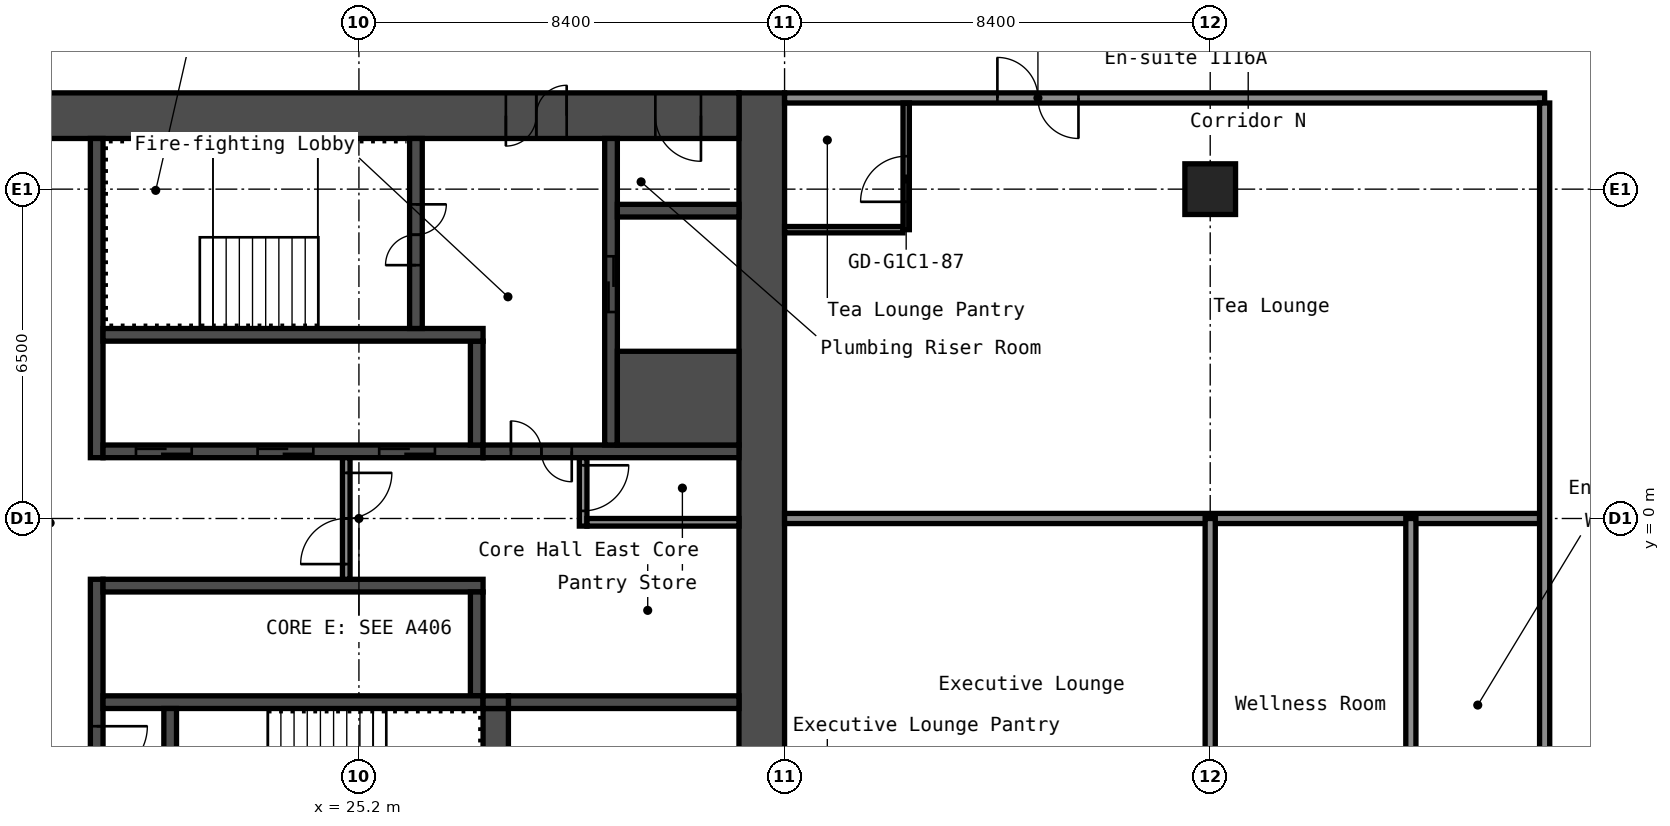
"""IFC4 building model, lengths in metres.
Left out: names, types, materials, properties, quantities, classifications, styles, units other than length and angle.
Written with IfcOpenShell. Run it as: python <this file> out.ifc"""

import sys

from ifc_helpers import new_model, si_unit, direction, frame, frame_2d, origin, origin_2d, place, context, subcontext, project, spatial, rectangle, hollow_rectangle, extrude, element, fill, save


model = new_model("IFC4")
c1 = context("Model", 3, precision=1e-05, world=origin(), true_north=direction((0.0, 1.0)))
c2 = subcontext(c1, "Body", "Model", "MODEL_VIEW")
j1 = project(units=[si_unit("LENGTHUNIT", "METRE"), si_unit("PLANEANGLEUNIT", "RADIAN")], contexts=[c1])
p1 = place(None, origin())
s1 = spatial("IfcSite", under=j1, at=p1, CompositionType="ELEMENT")
p2 = place(p1, origin())
s2 = spatial("IfcBuilding", under=s1, at=p2, CompositionType="ELEMENT")
p3 = place(p2, frame((0.0, 0.0, 42.2)))
s3 = spatial("IfcBuildingStorey", under=s2, at=p3, CompositionType="ELEMENT", Elevation=42.2)
p4 = place(p3, frame((42.0, 6.5, 0.0), z_axis=(0.0, 0.0, 1.0), x_axis=(1.0, 0.0, 0.0)))
e1 = element("IfcColumn", 1, at=p4, inside=s3, PredefinedType="COLUMN", context=c2, shape_type="SweptSolid", body=[
    extrude(hollow_rectangle(XDim=1.0, YDim=1.0, WallThickness=0.04, at=origin_2d()), origin(), (0.0, 0.0, 1.0), 2.8),
])
p5 = place(p3, frame((33.15, -8.4, 0.0), z_axis=(0.0, 0.0, 1.0), x_axis=(0.0, 1.0, 0.0)))
e2 = element("IfcWall", 2, at=p5, inside=s3, PredefinedType="SHEAR", context=c2, shape_type="SweptSolid", body=[
    extrude(rectangle(XDim=16.8, YDim=0.9, at=frame_2d((8.4, 0.0))), origin(), (0.0, 0.0, 1.0), 2.8),
])
p6 = place(p3, frame((17.7, 7.95, 0.0), z_axis=(0.0, 0.0, 1.0), x_axis=(1.0, 0.0, 0.0)))
e3 = element("IfcWall", 3, at=p6, inside=s3, PredefinedType="SHEAR", context=c2, shape_type="SweptSolid", body=[
    extrude(rectangle(XDim=15.0, YDim=0.9, at=frame_2d((7.5, 0.0))), origin(), (0.0, 0.0, 1.0), 2.8),
])
p7 = place(p6, frame((10.4, 0.0, 0.0)))
e4 = element("IfcOpeningElement", 4, at=p7, cuts=e3, PredefinedType="OPENING", context=c2, shape_type="SweptSolid", body=[
    extrude(rectangle(XDim=1.2, YDim=2.1, at=frame_2d((0.6, 1.05))), frame((0.0, 0.46, 0.0), z_axis=(0.0, -1.0, 0.0), x_axis=(1.0, 0.0, 0.0)), (0.0, 0.0, 1.0), 0.92),
])
p8 = place(p6, frame((13.35, 0.0, 0.0)))
e5 = element("IfcOpeningElement", 5, at=p8, cuts=e3, PredefinedType="OPENING", context=c2, shape_type="SweptSolid", body=[
    extrude(rectangle(XDim=0.9, YDim=2.1, at=frame_2d((0.45, 1.05))), frame((0.0, 0.46, 0.0), z_axis=(0.0, -1.0, 0.0), x_axis=(1.0, 0.0, 0.0)), (0.0, 0.0, 1.0), 0.92),
])
p9 = place(p3, frame((20.025, 1.2, 0.0), z_axis=(0.0, 0.0, 1.0), x_axis=(0.0, 1.0, 0.0)))
e6 = element("IfcWall", 6, at=p9, inside=s3, PredefinedType="SHEAR", context=c2, shape_type="SweptSolid", body=[
    extrude(rectangle(XDim=6.3, YDim=0.25, at=frame_2d((3.15, 0.0))), origin(), (0.0, 0.0, 1.0), 2.8),
])
p10 = place(p3, frame((20.025, -7.5, 0.0), z_axis=(0.0, 0.0, 1.0), x_axis=(0.0, 1.0, 0.0)))
e7 = element("IfcWall", 7, at=p10, inside=s3, PredefinedType="SHEAR", context=c2, shape_type="SweptSolid", body=[
    extrude(rectangle(XDim=6.3, YDim=0.25, at=frame_2d((3.15, 0.0))), origin(), (0.0, 0.0, 1.0), 2.8),
])
p11 = place(p10, frame((2.4, 0.0, 0.0)))
e8 = element("IfcOpeningElement", 8, at=p11, cuts=e7, PredefinedType="OPENING", context=c2, shape_type="SweptSolid", body=[
    extrude(rectangle(XDim=1.0, YDim=2.1, at=frame_2d((0.5, 1.05))), frame((0.0, 0.135, 0.0), z_axis=(0.0, -1.0, 0.0), x_axis=(1.0, 0.0, 0.0)), (0.0, 0.0, 1.0), 0.27),
])
p12 = place(p3, frame((20.15, 1.325, 0.0), z_axis=(0.0, 0.0, 1.0), x_axis=(1.0, 0.0, 0.0)))
e9 = element("IfcWall", 9, at=p12, inside=s3, PredefinedType="SHEAR", context=c2, shape_type="SweptSolid", body=[
    extrude(rectangle(XDim=7.5, YDim=0.25, at=frame_2d((3.75, 0.0))), origin(), (0.0, 0.0, 1.0), 2.8),
])
p13 = place(p12, frame((0.65, 0.0, 0.0)))
e10 = element("IfcOpeningElement", 10, at=p13, cuts=e9, PredefinedType="OPENING", context=c2, shape_type="SweptSolid", body=[
    extrude(rectangle(XDim=1.1, YDim=2.1, at=frame_2d((0.55, 1.05))), frame((0.0, 0.135, 0.0), z_axis=(0.0, -1.0, 0.0), x_axis=(1.0, 0.0, 0.0)), (0.0, 0.0, 1.0), 0.27),
])
p14 = place(p12, frame((3.05, 0.0, 0.0)))
e11 = element("IfcOpeningElement", 11, at=p14, cuts=e9, PredefinedType="OPENING", context=c2, shape_type="SweptSolid", body=[
    extrude(rectangle(XDim=1.1, YDim=2.1, at=frame_2d((0.55, 1.05))), frame((0.0, 0.135, 0.0), z_axis=(0.0, -1.0, 0.0), x_axis=(1.0, 0.0, 0.0)), (0.0, 0.0, 1.0), 0.27),
])
p15 = place(p12, frame((5.45, 0.0, 0.0)))
e12 = element("IfcOpeningElement", 12, at=p15, cuts=e9, PredefinedType="OPENING", context=c2, shape_type="SweptSolid", body=[
    extrude(rectangle(XDim=1.1, YDim=2.1, at=frame_2d((0.55, 1.05))), frame((0.0, 0.135, 0.0), z_axis=(0.0, -1.0, 0.0), x_axis=(1.0, 0.0, 0.0)), (0.0, 0.0, 1.0), 0.27),
])
p16 = place(p3, frame((27.525, 1.45, 0.0), z_axis=(0.0, 0.0, 1.0), x_axis=(0.0, 1.0, 0.0)))
e13 = element("IfcWall", 13, at=p16, inside=s3, PredefinedType="SHEAR", context=c2, shape_type="SweptSolid", body=[
    extrude(rectangle(XDim=2.05, YDim=0.25, at=frame_2d((1.025, 0.0))), origin(), (0.0, 0.0, 1.0), 2.8),
])
p17 = place(p3, frame((20.15, 3.625, 0.0), z_axis=(0.0, 0.0, 1.0), x_axis=(1.0, 0.0, 0.0)))
e14 = element("IfcWall", 14, at=p17, inside=s3, PredefinedType="SHEAR", context=c2, shape_type="SweptSolid", body=[
    extrude(rectangle(XDim=7.5, YDim=0.25, at=frame_2d((3.75, 0.0))), origin(), (0.0, 0.0, 1.0), 2.8),
])
p18 = place(p3, frame((26.325, 3.75, 0.0), z_axis=(0.0, 0.0, 1.0), x_axis=(0.0, 1.0, 0.0)))
e15 = element("IfcWall", 15, at=p18, inside=s3, PredefinedType="SHEAR", context=c2, shape_type="SweptSolid", body=[
    extrude(rectangle(XDim=3.75, YDim=0.25, at=frame_2d((1.875, 0.0))), origin(), (0.0, 0.0, 1.0), 2.8),
])
p19 = place(p18, frame((1.25, 0.0, 0.0)))
e16 = element("IfcOpeningElement", 16, at=p19, cuts=e15, PredefinedType="OPENING", context=c2, shape_type="SweptSolid", body=[
    extrude(rectangle(XDim=1.2, YDim=2.1, at=frame_2d((0.6, 1.05))), frame((0.0, 0.135, 0.0), z_axis=(0.0, -1.0, 0.0), x_axis=(1.0, 0.0, 0.0)), (0.0, 0.0, 1.0), 0.27),
])
p20 = place(p3, frame((27.65, 1.325, 0.0), z_axis=(0.0, 0.0, 1.0), x_axis=(1.0, 0.0, 0.0)))
e17 = element("IfcWall", 17, at=p20, inside=s3, PredefinedType="SHEAR", context=c2, shape_type="SweptSolid", body=[
    extrude(rectangle(XDim=5.05, YDim=0.25, at=frame_2d((2.525, 0.0))), origin(), (0.0, 0.0, 1.0), 2.8),
])
p21 = place(p20, frame((0.55, 0.0, 0.0)))
e18 = element("IfcOpeningElement", 18, at=p21, cuts=e17, PredefinedType="OPENING", context=c2, shape_type="SweptSolid", body=[
    extrude(rectangle(XDim=1.2, YDim=2.1, at=frame_2d((0.6, 1.05))), frame((0.0, 0.135, 0.0), z_axis=(0.0, -1.0, 0.0), x_axis=(1.0, 0.0, 0.0)), (0.0, 0.0, 1.0), 0.27),
])
p22 = place(p3, frame((30.175, 1.45, 0.0), z_axis=(0.0, 0.0, 1.0), x_axis=(0.0, 1.0, 0.0)))
e19 = element("IfcWall", 19, at=p22, inside=s3, PredefinedType="SHEAR", context=c2, shape_type="SweptSolid", body=[
    extrude(rectangle(XDim=6.05, YDim=0.25, at=frame_2d((3.025, 0.0))), origin(), (0.0, 0.0, 1.0), 2.8),
])
p23 = place(p22, frame((2.625, 0.0, 0.0)))
e20 = element("IfcOpeningElement", 20, at=p23, cuts=e19, PredefinedType="OPENING", context=c2, shape_type="SweptSolid", body=[
    extrude(rectangle(XDim=1.1, YDim=2.1, at=frame_2d((0.55, 1.05))), frame((0.0, 0.135, 0.0), z_axis=(0.0, -1.0, 0.0), x_axis=(1.0, 0.0, 0.0)), (0.0, 0.0, 1.0), 0.27),
])
p24 = place(p3, frame((30.3, 2.375, 0.0), z_axis=(0.0, 0.0, 1.0), x_axis=(1.0, 0.0, 0.0)))
e21 = element("IfcWall", 21, at=p24, inside=s3, PredefinedType="SHEAR", context=c2, shape_type="SweptSolid", body=[
    extrude(rectangle(XDim=2.4, YDim=1.85, at=frame_2d((1.2, 0.0))), origin(), (0.0, 0.0, 1.0), 2.8),
])
p25 = place(p3, frame((30.3, 6.075, 0.0), z_axis=(0.0, 0.0, 1.0), x_axis=(1.0, 0.0, 0.0)))
e22 = element("IfcWall", 22, at=p25, inside=s3, PredefinedType="SHEAR", context=c2, shape_type="SweptSolid", body=[
    extrude(rectangle(XDim=2.4, YDim=0.25, at=frame_2d((1.2, 0.0))), origin(), (0.0, 0.0, 1.0), 2.8),
])
p26 = place(p3, frame((20.15, -1.325, 0.0), z_axis=(0.0, 0.0, 1.0), x_axis=(1.0, 0.0, 0.0)))
e23 = element("IfcWall", 23, at=p26, inside=s3, PredefinedType="SHEAR", context=c2, shape_type="SweptSolid", body=[
    extrude(rectangle(XDim=7.5, YDim=0.25, at=frame_2d((3.75, 0.0))), origin(), (0.0, 0.0, 1.0), 2.8),
])
p27 = place(p3, frame((27.525, -3.5, 0.0), z_axis=(0.0, 0.0, 1.0), x_axis=(0.0, 1.0, 0.0)))
e24 = element("IfcWall", 24, at=p27, inside=s3, PredefinedType="SHEAR", context=c2, shape_type="SweptSolid", body=[
    extrude(rectangle(XDim=2.05, YDim=0.25, at=frame_2d((1.025, 0.0))), origin(), (0.0, 0.0, 1.0), 2.8),
])
p28 = place(p3, frame((20.15, -3.625, 0.0), z_axis=(0.0, 0.0, 1.0), x_axis=(1.0, 0.0, 0.0)))
e25 = element("IfcWall", 25, at=p28, inside=s3, PredefinedType="SHEAR", context=c2, shape_type="SweptSolid", body=[
    extrude(rectangle(XDim=7.5, YDim=0.25, at=frame_2d((3.75, 0.0))), origin(), (0.0, 0.0, 1.0), 2.8),
])
p29 = place(p3, frame((21.475, -7.5, 0.0), z_axis=(0.0, 0.0, 1.0), x_axis=(0.0, 1.0, 0.0)))
e26 = element("IfcWall", 26, at=p29, inside=s3, PredefinedType="SHEAR", context=c2, shape_type="SweptSolid", body=[
    extrude(rectangle(XDim=3.75, YDim=0.25, at=frame_2d((1.875, 0.0))), origin(), (0.0, 0.0, 1.0), 2.8),
])
p30 = place(p29, frame((1.3, 0.0, 0.0)))
e27 = element("IfcOpeningElement", 27, at=p30, cuts=e26, PredefinedType="OPENING", context=c2, shape_type="SweptSolid", body=[
    extrude(rectangle(XDim=1.2, YDim=2.1, at=frame_2d((0.6, 1.05))), frame((0.0, 0.135, 0.0), z_axis=(0.0, -1.0, 0.0), x_axis=(1.0, 0.0, 0.0)), (0.0, 0.0, 1.0), 0.27),
])
p31 = place(p3, frame((27.9, -7.5, 0.0), z_axis=(0.0, 0.0, 1.0), x_axis=(0.0, 1.0, 0.0)))
e28 = element("IfcWall", 28, at=p31, inside=s3, PredefinedType="SHEAR", context=c2, shape_type="SweptSolid", body=[
    extrude(rectangle(XDim=3.75, YDim=0.5, at=frame_2d((1.875, 0.0))), origin(), (0.0, 0.0, 1.0), 2.8),
])
p32 = place(p3, frame((28.15, -3.625, 0.0), z_axis=(0.0, 0.0, 1.0), x_axis=(1.0, 0.0, 0.0)))
e29 = element("IfcWall", 29, at=p32, inside=s3, PredefinedType="SHEAR", context=c2, shape_type="SweptSolid", body=[
    extrude(rectangle(XDim=4.55, YDim=0.25, at=frame_2d((2.275, 0.0))), origin(), (0.0, 0.0, 1.0), 2.8),
])
p33 = place(p3, frame((27.65, -3.625, 0.0), z_axis=(0.0, 0.0, 1.0), x_axis=(1.0, 0.0, 0.0)))
e30 = element("IfcWall", 30, at=p33, inside=s3, PredefinedType="SHEAR", context=c2, shape_type="SweptSolid", body=[
    extrude(rectangle(XDim=0.5, YDim=0.25, at=frame_2d((0.25, 0.0))), origin(), (0.0, 0.0, 1.0), 2.8),
])
p34 = place(p3, frame((24.95, -1.2, 0.0), z_axis=(0.0, 0.0, 1.0), x_axis=(0.0, 1.0, 0.0)))
e31 = element("IfcWall", 31, at=p34, inside=s3, PredefinedType="PARTITIONING", context=c2, shape_type="SweptSolid", body=[
    extrude(rectangle(XDim=2.4, YDim=0.15, at=frame_2d((1.2, 0.0))), origin(), (0.0, 0.0, 1.0), 2.8),
])
p35 = place(p34, frame((0.3, 0.0, 0.0)))
e32 = element("IfcOpeningElement", 32, at=p35, cuts=e31, PredefinedType="OPENING", context=c2, shape_type="SweptSolid", body=[
    extrude(rectangle(XDim=1.8, YDim=2.1, at=frame_2d((0.9, 1.05))), frame((0.0, 0.085, 0.0), z_axis=(0.0, -1.0, 0.0), x_axis=(1.0, 0.0, 0.0)), (0.0, 0.0, 1.0), 0.17),
])
p36 = place(p3, frame((29.625, -0.15, 0.0), z_axis=(0.0, 0.0, 1.0), x_axis=(0.0, 1.0, 0.0)))
e33 = element("IfcWall", 33, at=p36, inside=s3, PredefinedType="PARTITIONING", context=c2, shape_type="SweptSolid", body=[
    extrude(rectangle(XDim=1.35, YDim=0.15, at=frame_2d((0.675, 0.0))), origin(), (0.0, 0.0, 1.0), 2.8),
])
p37 = place(p36, frame((0.3, 0.0, 0.0)))
e34 = element("IfcOpeningElement", 34, at=p37, cuts=e33, PredefinedType="OPENING", context=c2, shape_type="SweptSolid", body=[
    extrude(rectangle(XDim=0.9, YDim=2.1, at=frame_2d((0.45, 1.05))), frame((0.0, 0.085, 0.0), z_axis=(0.0, -1.0, 0.0), x_axis=(1.0, 0.0, 0.0)), (0.0, 0.0, 1.0), 0.17),
])
p38 = place(p3, frame((29.7, -0.075, 0.0), z_axis=(0.0, 0.0, 1.0), x_axis=(1.0, 0.0, 0.0)))
e35 = element("IfcWall", 35, at=p38, inside=s3, PredefinedType="PARTITIONING", context=c2, shape_type="SweptSolid", body=[
    extrude(rectangle(XDim=3.0, YDim=0.15, at=frame_2d((1.5, 0.0))), origin(), (0.0, 0.0, 1.0), 2.8),
])
p39 = place(p3, frame((33.6, 0.0, 0.0), z_axis=(0.0, 0.0, 1.0), x_axis=(1.0, 0.0, 0.0)))
e36 = element("IfcWall", 36, at=p39, inside=s3, PredefinedType="PARTITIONING", context=c2, shape_type="SweptSolid", body=[
    extrude(rectangle(XDim=14.9, YDim=0.2, at=frame_2d((7.45, 0.0))), origin(), (0.0, 0.0, 1.0), 2.8),
])
p40 = place(p3, frame((33.6, 5.7, 0.0), z_axis=(0.0, 0.0, 1.0), x_axis=(1.0, 0.0, 0.0)))
e37 = element("IfcWall", 37, at=p40, inside=s3, PredefinedType="PARTITIONING", context=c2, shape_type="SweptSolid", body=[
    extrude(rectangle(XDim=2.337, YDim=0.125, at=frame_2d((1.169, 0.0))), origin(), (0.0, 0.0, 1.0), 2.8),
])
p41 = place(p3, frame((33.6, 8.3, 0.0), z_axis=(0.0, 0.0, 1.0), x_axis=(1.0, 0.0, 0.0)))
e38 = element("IfcWall", 38, at=p41, inside=s3, PredefinedType="PARTITIONING", context=c2, shape_type="SweptSolid", body=[
    extrude(rectangle(XDim=15.0, YDim=0.2, at=frame_2d((7.5, 0.0))), origin(), (0.0, 0.0, 1.0), 2.8),
])
p42 = place(p41, frame((4.2, 0.0, 0.0)))
e39 = element("IfcOpeningElement", 39, at=p42, cuts=e38, PredefinedType="OPENING", context=c2, shape_type="SweptSolid", body=[
    extrude(rectangle(XDim=1.6, YDim=2.1, at=frame_2d((0.8, 1.05))), frame((0.0, 0.11, 0.0), z_axis=(0.0, -1.0, 0.0), x_axis=(1.0, 0.0, 0.0)), (0.0, 0.0, 1.0), 0.22),
])
p43 = place(p3, frame((36.0, 5.7, 0.0), z_axis=(0.0, 0.0, 1.0), x_axis=(0.0, 1.0, 0.0)))
e40 = element("IfcWall", 40, at=p43, inside=s3, PredefinedType="PARTITIONING", context=c2, shape_type="SweptSolid", body=[
    extrude(rectangle(XDim=2.5, YDim=0.125, at=frame_2d((1.25, 0.0))), origin(), (0.0, 0.0, 1.0), 2.8),
])
p44 = place(p43, frame((0.55, 0.0, 0.0)))
e41 = element("IfcOpeningElement", 41, at=p44, cuts=e40, PredefinedType="OPENING", context=c2, shape_type="SweptSolid", body=[
    extrude(rectangle(XDim=0.9, YDim=2.1, at=frame_2d((0.45, 1.05))), frame((0.0, 0.073, 0.0), z_axis=(0.0, -1.0, 0.0), x_axis=(1.0, 0.0, 0.0)), (0.0, 0.0, 1.0), 0.145),
])
for number, where, z_axis, x_axis in (
    (42, (42.0, -8.2, 0.0), (0.0, 0.0, 1.0), (0.0, 1.0, 0.0)),
    (43, (45.96, -8.2, 0.0), (0.0, 0.0, 1.0), (0.0, 1.0, 0.0)),
):
    element("IfcWall", number, at=place(p3, frame(where, z_axis=z_axis, x_axis=x_axis)), inside=s3, PredefinedType="PARTITIONING", context=c2, shape_type="SweptSolid", body=[
        extrude(rectangle(XDim=8.2, YDim=0.2, at=frame_2d((4.1, 0.0))), origin(), (0.0, 0.0, 1.0), 2.8),
    ])
p45 = place(p3, frame((48.6, -8.2, 0.0), z_axis=(0.0, 0.0, 1.0), x_axis=(0.0, 1.0, 0.0)))
e44 = element("IfcWall", 44, at=p45, inside=s3, PredefinedType="PARTITIONING", context=c2, shape_type="SweptSolid", body=[
    extrude(rectangle(XDim=16.4, YDim=0.2, at=frame_2d((8.2, 0.0))), origin(), (0.0, 0.0, 1.0), 2.8),
])
p46 = place(p7, origin())
e45 = element("IfcDoor", 45, at=p46, inside=s3, OperationType="DOUBLE_DOOR_SINGLE_SWING", PredefinedType="DOOR", context=c2, shape_type="SweptSolid", body=[
    extrude(rectangle(XDim=1.2, YDim=2.1, at=frame_2d((0.6, 1.05))), frame((0.0, 0.025, 0.0), z_axis=(0.0, -1.0, 0.0), x_axis=(1.0, 0.0, 0.0)), (0.0, 0.0, 1.0), 0.05),
])
fill(e4, e45)
p47 = place(p8, origin())
e46 = element("IfcDoor", 46, at=p47, inside=s3, OperationType="SINGLE_SWING_RIGHT", PredefinedType="DOOR", context=c2, shape_type="SweptSolid", body=[
    extrude(rectangle(XDim=0.9, YDim=2.1, at=frame_2d((0.45, 1.05))), frame((0.0, 0.025, 0.0), z_axis=(0.0, -1.0, 0.0), x_axis=(1.0, 0.0, 0.0)), (0.0, 0.0, 1.0), 0.05),
])
fill(e5, e46)
p48 = place(p19, origin())
e47 = element("IfcDoor", 47, at=p48, inside=s3, OperationType="DOUBLE_DOOR_SINGLE_SWING", PredefinedType="DOOR", context=c2, shape_type="SweptSolid", body=[
    extrude(rectangle(XDim=1.2, YDim=2.1, at=frame_2d((0.6, 1.05))), frame((0.0, 0.025, 0.0), z_axis=(0.0, -1.0, 0.0), x_axis=(1.0, 0.0, 0.0)), (0.0, 0.0, 1.0), 0.05),
])
fill(e16, e47)
p49 = place(p11, origin())
e48 = element("IfcDoor", 48, at=p49, inside=s3, OperationType="SINGLE_SWING_RIGHT", PredefinedType="DOOR", context=c2, shape_type="SweptSolid", body=[
    extrude(rectangle(XDim=1.0, YDim=2.1, at=frame_2d((0.5, 1.05))), frame((0.0, 0.025, 0.0), z_axis=(0.0, -1.0, 0.0), x_axis=(1.0, 0.0, 0.0)), (0.0, 0.0, 1.0), 0.05),
])
fill(e8, e48)
p50 = place(p21, origin())
e49 = element("IfcDoor", 49, at=p50, inside=s3, OperationType="DOUBLE_DOOR_SINGLE_SWING", PredefinedType="DOOR", context=c2, shape_type="SweptSolid", body=[
    extrude(rectangle(XDim=1.2, YDim=2.1, at=frame_2d((0.6, 1.05))), frame((0.0, 0.025, 0.0), z_axis=(0.0, -1.0, 0.0), x_axis=(1.0, 0.0, 0.0)), (0.0, 0.0, 1.0), 0.05),
])
fill(e18, e49)
p51 = place(p35, origin())
e50 = element("IfcDoor", 50, at=p51, inside=s3, OperationType="DOUBLE_DOOR_SINGLE_SWING", PredefinedType="DOOR", context=c2, shape_type="SweptSolid", body=[
    extrude(rectangle(XDim=1.8, YDim=2.1, at=frame_2d((0.9, 1.05))), frame((0.0, 0.025, 0.0), z_axis=(0.0, -1.0, 0.0), x_axis=(1.0, 0.0, 0.0)), (0.0, 0.0, 1.0), 0.05),
])
fill(e32, e50)
p52 = place(p37, origin())
e51 = element("IfcDoor", 51, at=p52, inside=s3, OperationType="SINGLE_SWING_RIGHT", PredefinedType="DOOR", context=c2, shape_type="SweptSolid", body=[
    extrude(rectangle(XDim=0.9, YDim=2.1, at=frame_2d((0.45, 1.05))), frame((0.0, 0.025, 0.0), z_axis=(0.0, -1.0, 0.0), x_axis=(1.0, 0.0, 0.0)), (0.0, 0.0, 1.0), 0.05),
])
fill(e34, e51)
p53 = place(p13, origin())
e52 = element("IfcDoor", 52, at=p53, inside=s3, OperationType="DOUBLE_DOOR_SLIDING", PredefinedType="DOOR", context=c2, shape_type="SweptSolid", body=[
    extrude(rectangle(XDim=1.1, YDim=2.1, at=frame_2d((0.55, 1.05))), frame((0.0, 0.025, 0.0), z_axis=(0.0, -1.0, 0.0), x_axis=(1.0, 0.0, 0.0)), (0.0, 0.0, 1.0), 0.05),
])
fill(e10, e52)
p54 = place(p14, origin())
e53 = element("IfcDoor", 53, at=p54, inside=s3, OperationType="DOUBLE_DOOR_SLIDING", PredefinedType="DOOR", context=c2, shape_type="SweptSolid", body=[
    extrude(rectangle(XDim=1.1, YDim=2.1, at=frame_2d((0.55, 1.05))), frame((0.0, 0.025, 0.0), z_axis=(0.0, -1.0, 0.0), x_axis=(1.0, 0.0, 0.0)), (0.0, 0.0, 1.0), 0.05),
])
fill(e11, e53)
p55 = place(p15, origin())
e54 = element("IfcDoor", 54, at=p55, inside=s3, OperationType="DOUBLE_DOOR_SLIDING", PredefinedType="DOOR", context=c2, shape_type="SweptSolid", body=[
    extrude(rectangle(XDim=1.1, YDim=2.1, at=frame_2d((0.55, 1.05))), frame((0.0, 0.025, 0.0), z_axis=(0.0, -1.0, 0.0), x_axis=(1.0, 0.0, 0.0)), (0.0, 0.0, 1.0), 0.05),
])
fill(e12, e54)
p56 = place(p23, origin())
e55 = element("IfcDoor", 55, at=p56, inside=s3, OperationType="DOUBLE_DOOR_SLIDING", PredefinedType="DOOR", context=c2, shape_type="SweptSolid", body=[
    extrude(rectangle(XDim=1.1, YDim=2.1, at=frame_2d((0.55, 1.05))), frame((0.0, 0.025, 0.0), z_axis=(0.0, -1.0, 0.0), x_axis=(1.0, 0.0, 0.0)), (0.0, 0.0, 1.0), 0.05),
])
fill(e20, e55)
p57 = place(p42, origin())
e56 = element("IfcDoor", 56, at=p57, inside=s3, OperationType="DOUBLE_DOOR_SINGLE_SWING", PredefinedType="DOOR", context=c2, shape_type="SweptSolid", body=[
    extrude(rectangle(XDim=1.6, YDim=2.1, at=frame_2d((0.8, 1.05))), frame((0.0, 0.025, 0.0), z_axis=(0.0, -1.0, 0.0), x_axis=(1.0, 0.0, 0.0)), (0.0, 0.0, 1.0), 0.05),
])
fill(e39, e56)
p58 = place(p44, origin())
e57 = element("IfcDoor", 57, at=p58, inside=s3, OperationType="SINGLE_SWING_RIGHT", PredefinedType="DOOR", context=c2, shape_type="SweptSolid", body=[
    extrude(rectangle(XDim=0.9, YDim=2.1, at=frame_2d((0.45, 1.05))), frame((0.0, 0.025, 0.0), z_axis=(0.0, -1.0, 0.0), x_axis=(1.0, 0.0, 0.0)), (0.0, 0.0, 1.0), 0.05),
])
fill(e41, e57)
save(model, sys.argv[1])
